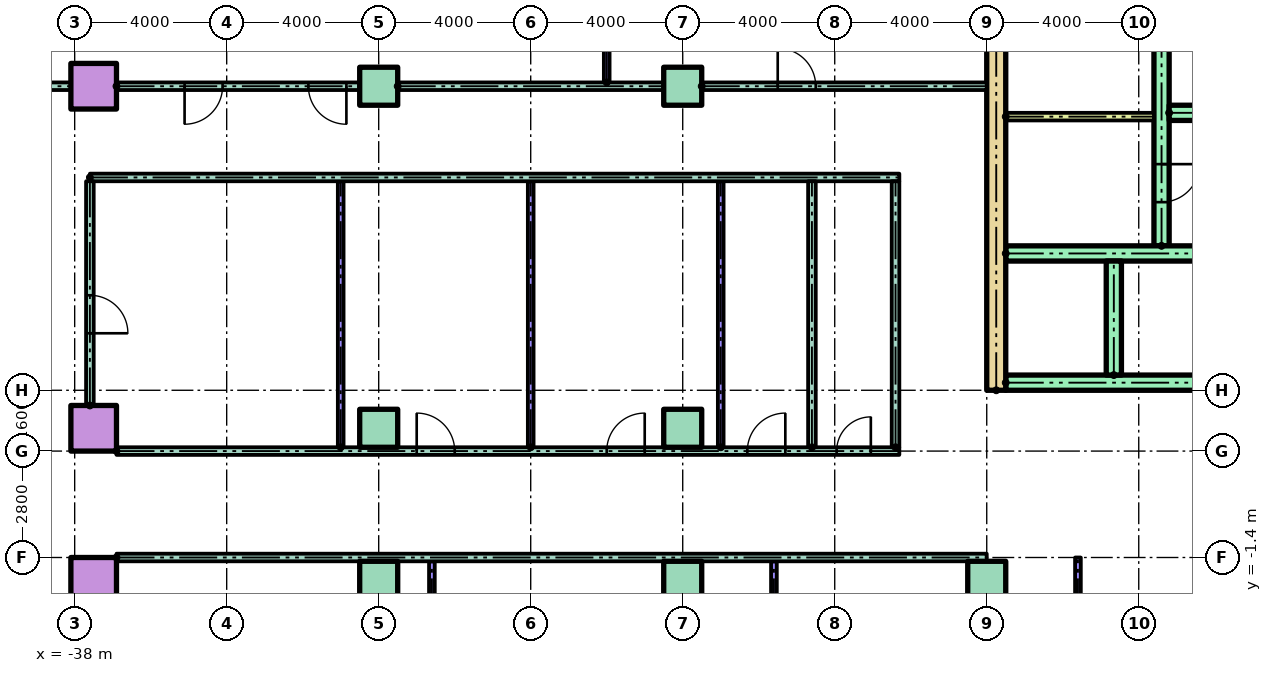
"""IFC4 building model, lengths in metres.
Left out: names, types, materials, properties, quantities, classifications, styles, units other than length and angle.
Written with IfcOpenShell. Run it as: python <this file> out.ifc"""

import sys

from ifc_helpers import new_model, si_unit, direction, frame, frame_2d, origin, origin_2d, place, context, subcontext, project, spatial, rectangle, hollow_rectangle, extrude, element, fill, save


model = new_model("IFC4")
c1 = context("Model", 3, precision=1e-05, world=origin(), true_north=direction((0.0, 1.0)))
c2 = subcontext(c1, "Body", "Model", "MODEL_VIEW")
j1 = project(units=[si_unit("LENGTHUNIT", "METRE"), si_unit("PLANEANGLEUNIT", "RADIAN")], contexts=[c1])
p1 = place(None, origin())
s1 = spatial("IfcSite", under=j1, at=p1, CompositionType="ELEMENT")
p2 = place(p1, origin())
s2 = spatial("IfcBuilding", under=s1, at=p2, CompositionType="ELEMENT")
p3 = place(p2, frame((0.0, 0.0, 6.0)))
s3 = spatial("IfcBuildingStorey", under=s2, at=p3, CompositionType="ELEMENT", Elevation=6.0)
p4 = place(p3, frame((-37.5, -2.0, 0.0)))
e1 = element("IfcColumn", 1, at=p4, inside=s3, PredefinedType="COLUMN", context=c2, shape_type="SweptSolid", body=[
    extrude(hollow_rectangle(XDim=1.2, YDim=1.2, WallThickness=0.06, at=origin_2d()), origin(), (0.0, 0.0, 1.0), 4.0),
])
for number, where in (
    (2, (-30.0, -2.0, 0.0)),
    (3, (-22.0, -2.0, 0.0)),
    (4, (-14.0, -2.0, 0.0)),
):
    element("IfcColumn", number, at=place(p3, frame(where)), inside=s3, PredefinedType="COLUMN", context=c2, shape_type="SweptSolid", body=[
        extrude(rectangle(XDim=1.0, YDim=1.0, at=origin_2d()), origin(), (0.0, 0.0, 1.0), 4.0),
    ])
p5 = place(p3, frame((-37.5, 2.0, 0.0)))
e5 = element("IfcColumn", 5, at=p5, inside=s3, PredefinedType="COLUMN", context=c2, shape_type="SweptSolid", body=[
    extrude(hollow_rectangle(XDim=1.2, YDim=1.2, WallThickness=0.06, at=origin_2d()), origin(), (0.0, 0.0, 1.0), 4.0),
])
for number, where in (
    (6, (-30.0, 2.0, 0.0)),
    (7, (-22.0, 2.0, 0.0)),
):
    element("IfcColumn", number, at=place(p3, frame(where)), inside=s3, PredefinedType="COLUMN", context=c2, shape_type="SweptSolid", body=[
        extrude(rectangle(XDim=1.0, YDim=1.0, at=origin_2d()), origin(), (0.0, 0.0, 1.0), 4.0),
    ])
p6 = place(p3, frame((-37.5, 11.0, 0.0)))
e8 = element("IfcColumn", 8, at=p6, inside=s3, PredefinedType="COLUMN", context=c2, shape_type="SweptSolid", body=[
    extrude(hollow_rectangle(XDim=1.2, YDim=1.2, WallThickness=0.06, at=origin_2d()), origin(), (0.0, 0.0, 1.0), 4.0),
])
for number, where in (
    (9, (-30.0, 11.0, 0.0)),
    (10, (-22.0, 11.0, 0.0)),
):
    element("IfcColumn", number, at=place(p3, frame(where)), inside=s3, PredefinedType="COLUMN", context=c2, shape_type="SweptSolid", body=[
        extrude(rectangle(XDim=1.0, YDim=1.0, at=origin_2d()), origin(), (0.0, 0.0, 1.0), 4.0),
    ])
p7 = place(p3, frame((-13.75, 3.0, 0.0), z_axis=(0.0, 0.0, 1.0), x_axis=(0.0, 1.0, 0.0)))
e11 = element("IfcWall", 11, at=p7, inside=s3, PredefinedType="SHEAR", context=c2, shape_type="SweptSolid", body=[
    extrude(rectangle(XDim=17.0, YDim=0.5, at=frame_2d((8.5, 0.0))), origin(), (0.0, 0.0, 1.0), 3.7),
])
p8 = place(p3, frame((-9.4, 6.8, 0.0), z_axis=(0.0, 0.0, 1.0), x_axis=(0.0, 1.0, 0.0)))
e12 = element("IfcWall", 12, at=p8, inside=s3, PredefinedType="SHEAR", context=c2, shape_type="SweptSolid", body=[
    extrude(rectangle(XDim=12.7, YDim=0.4, at=frame_2d((6.35, 0.0))), origin(), (0.0, 0.0, 1.0), 3.7),
])
p9 = place(p8, frame((1.15, 0.0, 0.0)))
e13 = element("IfcOpeningElement", 13, at=p9, cuts=e12, PredefinedType="OPENING", context=c2, shape_type="SweptSolid", body=[
    extrude(rectangle(XDim=1.0, YDim=2.1, at=frame_2d((0.5, 1.05))), frame((0.0, 0.21, 0.0), z_axis=(0.0, -1.0, 0.0), x_axis=(1.0, 0.0, 0.0)), (0.0, 0.0, 1.0), 0.42),
])
p10 = place(p8, frame((7.925, 0.0, 0.0)))
e14 = element("IfcOpeningElement", 14, at=p10, cuts=e12, PredefinedType="OPENING", context=c2, shape_type="SweptSolid", body=[
    extrude(rectangle(XDim=1.0, YDim=2.1, at=frame_2d((0.5, 1.05))), frame((0.0, 0.21, 0.0), z_axis=(0.0, -1.0, 0.0), x_axis=(1.0, 0.0, 0.0)), (0.0, 0.0, 1.0), 0.42),
])
p11 = place(p3, frame((-13.5, 3.2, 0.0)))
e15 = element("IfcWall", 15, at=p11, inside=s3, PredefinedType="SHEAR", context=c2, shape_type="SweptSolid", body=[
    extrude(rectangle(XDim=27.0, YDim=0.4, at=frame_2d((13.5, 0.0))), origin(), (0.0, 0.0, 1.0), 3.7),
])
p12 = place(p11, frame((6.861, 0.0, 0.0)))
e16 = element("IfcOpeningElement", 16, at=p12, cuts=e15, PredefinedType="OPENING", context=c2, shape_type="SweptSolid", body=[
    extrude(rectangle(XDim=1.1, YDim=2.1, at=frame_2d((0.55, 1.05))), frame((0.0, 0.21, 0.0), z_axis=(0.0, -1.0, 0.0), x_axis=(1.0, 0.0, 0.0)), (0.0, 0.0, 1.0), 0.42),
])
p13 = place(p11, frame((9.906, 0.0, 0.0)))
e17 = element("IfcOpeningElement", 17, at=p13, cuts=e15, PredefinedType="OPENING", context=c2, shape_type="SweptSolid", body=[
    extrude(rectangle(XDim=1.1, YDim=2.1, at=frame_2d((0.55, 1.05))), frame((0.0, 0.21, 0.0), z_axis=(0.0, -1.0, 0.0), x_axis=(1.0, 0.0, 0.0)), (0.0, 0.0, 1.0), 0.42),
])
p14 = place(p11, frame((15.994, 0.0, 0.0)))
e18 = element("IfcOpeningElement", 18, at=p14, cuts=e15, PredefinedType="OPENING", context=c2, shape_type="SweptSolid", body=[
    extrude(rectangle(XDim=1.1, YDim=2.1, at=frame_2d((0.55, 1.05))), frame((0.0, 0.21, 0.0), z_axis=(0.0, -1.0, 0.0), x_axis=(1.0, 0.0, 0.0)), (0.0, 0.0, 1.0), 0.42),
])
p15 = place(p11, frame((19.039, 0.0, 0.0)))
e19 = element("IfcOpeningElement", 19, at=p15, cuts=e15, PredefinedType="OPENING", context=c2, shape_type="SweptSolid", body=[
    extrude(rectangle(XDim=1.1, YDim=2.1, at=frame_2d((0.55, 1.05))), frame((0.0, 0.21, 0.0), z_axis=(0.0, -1.0, 0.0), x_axis=(1.0, 0.0, 0.0)), (0.0, 0.0, 1.0), 0.42),
])
p16 = place(p11, frame((12.6, 0.0, 0.0)))
e20 = element("IfcOpeningElement", 20, at=p16, cuts=e15, PredefinedType="OPENING", context=c2, shape_type="SweptSolid", body=[
    extrude(rectangle(XDim=1.8, YDim=2.1, at=frame_2d((0.9, 1.05))), frame((0.0, 0.21, 0.0), z_axis=(0.0, -1.0, 0.0), x_axis=(1.0, 0.0, 0.0)), (0.0, 0.0, 1.0), 0.42),
])
p17 = place(p3, frame((-13.5, 6.6, 0.0)))
e21 = element("IfcWall", 21, at=p17, inside=s3, PredefinedType="SHEAR", context=c2, shape_type="SweptSolid", body=[
    extrude(rectangle(XDim=11.978, YDim=0.4, at=frame_2d((5.989, 0.0))), origin(), (0.0, 0.0, 1.0), 3.7),
])
p18 = place(p3, frame((-10.656, 3.4, 0.0), z_axis=(0.0, 0.0, 1.0), x_axis=(0.0, 1.0, 0.0)))
e22 = element("IfcWall", 22, at=p18, inside=s3, PredefinedType="SHEAR", context=c2, shape_type="SweptSolid", body=[
    extrude(rectangle(XDim=3.0, YDim=0.4, at=frame_2d((1.5, 0.0))), origin(), (0.0, 0.0, 1.0), 3.7),
])
p19 = place(p3, frame((-9.2, 10.3, 0.0)))
e23 = element("IfcWall", 23, at=p19, inside=s3, PredefinedType="SHEAR", context=c2, shape_type="SweptSolid", body=[
    extrude(rectangle(XDim=8.0, YDim=0.4, at=frame_2d((4.0, 0.0))), origin(), (0.0, 0.0, 1.0), 3.7),
])
p20 = place(p19, frame((2.033, 0.0, 0.0)))
e24 = element("IfcOpeningElement", 24, at=p20, cuts=e23, PredefinedType="OPENING", context=c2, shape_type="SweptSolid", body=[
    extrude(rectangle(XDim=1.0, YDim=2.1, at=frame_2d((0.5, 1.05))), frame((0.0, 0.21, 0.0), z_axis=(0.0, -1.0, 0.0), x_axis=(1.0, 0.0, 0.0)), (0.0, 0.0, 1.0), 0.42),
])
p21 = place(p19, frame((6.133, 0.0, 0.0)))
e25 = element("IfcOpeningElement", 25, at=p21, cuts=e23, PredefinedType="OPENING", context=c2, shape_type="SweptSolid", body=[
    extrude(rectangle(XDim=1.0, YDim=2.1, at=frame_2d((0.5, 1.05))), frame((0.0, 0.21, 0.0), z_axis=(0.0, -1.0, 0.0), x_axis=(1.0, 0.0, 0.0)), (0.0, 0.0, 1.0), 0.42),
])
p22 = place(p3, frame((-13.5, 10.2, 0.0)))
e26 = element("IfcWall", 26, at=p22, inside=s3, PredefinedType="PARTITIONING", context=c2, shape_type="SweptSolid", body=[
    extrude(rectangle(XDim=3.9, YDim=0.2, at=frame_2d((1.95, 0.0))), origin(), (0.0, 0.0, 1.0), 3.7),
])
p23 = place(p3, frame((-36.9, -1.4, 0.0)))
e27 = element("IfcWall", 27, at=p23, inside=s3, PredefinedType="PARTITIONING", context=c2, shape_type="SweptSolid", body=[
    extrude(rectangle(XDim=22.9, YDim=0.2, at=frame_2d((11.45, 0.0))), origin(), (0.0, 0.0, 1.0), 3.7),
])
p24 = place(p3, frame((-36.9, 1.4, 0.0)))
e28 = element("IfcWall", 28, at=p24, inside=s3, PredefinedType="PARTITIONING", context=c2, shape_type="SweptSolid", body=[
    extrude(rectangle(XDim=20.6, YDim=0.2, at=frame_2d((10.3, 0.0))), origin(), (0.0, 0.0, 1.0), 3.7),
])
p25 = place(p24, frame((7.9, 0.0, 0.0)))
e29 = element("IfcOpeningElement", 29, at=p25, cuts=e28, PredefinedType="OPENING", context=c2, shape_type="SweptSolid", body=[
    extrude(rectangle(XDim=1.0, YDim=2.1, at=frame_2d((0.5, 1.05))), frame((0.0, 0.11, 0.0), z_axis=(0.0, -1.0, 0.0), x_axis=(1.0, 0.0, 0.0)), (0.0, 0.0, 1.0), 0.22),
])
p26 = place(p24, frame((12.9, 0.0, 0.0)))
e30 = element("IfcOpeningElement", 30, at=p26, cuts=e28, PredefinedType="OPENING", context=c2, shape_type="SweptSolid", body=[
    extrude(rectangle(XDim=1.0, YDim=2.1, at=frame_2d((0.5, 1.05))), frame((0.0, 0.11, 0.0), z_axis=(0.0, -1.0, 0.0), x_axis=(1.0, 0.0, 0.0)), (0.0, 0.0, 1.0), 0.22),
])
p27 = place(p24, frame((16.6, 0.0, 0.0)))
e31 = element("IfcOpeningElement", 31, at=p27, cuts=e28, PredefinedType="OPENING", context=c2, shape_type="SweptSolid", body=[
    extrude(rectangle(XDim=1.0, YDim=2.1, at=frame_2d((0.5, 1.05))), frame((0.0, 0.11, 0.0), z_axis=(0.0, -1.0, 0.0), x_axis=(1.0, 0.0, 0.0)), (0.0, 0.0, 1.0), 0.22),
])
p28 = place(p24, frame((18.95, 0.0, 0.0)))
e32 = element("IfcOpeningElement", 32, at=p28, cuts=e28, PredefinedType="OPENING", context=c2, shape_type="SweptSolid", body=[
    extrude(rectangle(XDim=0.9, YDim=2.1, at=frame_2d((0.45, 1.05))), frame((0.0, 0.11, 0.0), z_axis=(0.0, -1.0, 0.0), x_axis=(1.0, 0.0, 0.0)), (0.0, 0.0, 1.0), 0.22),
])
p29 = place(p3, frame((-37.6, 8.6, 0.0)))
e33 = element("IfcWall", 33, at=p29, inside=s3, PredefinedType="PARTITIONING", context=c2, shape_type="SweptSolid", body=[
    extrude(rectangle(XDim=21.3, YDim=0.2, at=frame_2d((10.65, 0.0))), origin(), (0.0, 0.0, 1.0), 3.7),
])
p30 = place(p3, frame((-39.6, 11.0, 0.0)))
e34 = element("IfcWall", 34, at=p30, inside=s3, PredefinedType="PARTITIONING", context=c2, shape_type="SweptSolid", body=[
    extrude(rectangle(XDim=1.5, YDim=0.2, at=frame_2d((0.75, 0.0))), origin(), (0.0, 0.0, 1.0), 3.7),
])
p31 = place(p3, frame((-36.9, 11.0, 0.0)))
e35 = element("IfcWall", 35, at=p31, inside=s3, PredefinedType="PARTITIONING", context=c2, shape_type="SweptSolid", body=[
    extrude(rectangle(XDim=6.4, YDim=0.2, at=frame_2d((3.2, 0.0))), origin(), (0.0, 0.0, 1.0), 3.7),
])
p32 = place(p31, frame((1.792, 0.0, 0.0)))
e36 = element("IfcOpeningElement", 36, at=p32, cuts=e35, PredefinedType="OPENING", context=c2, shape_type="SweptSolid", body=[
    extrude(rectangle(XDim=1.0, YDim=2.1, at=frame_2d((0.5, 1.05))), frame((0.0, 0.11, 0.0), z_axis=(0.0, -1.0, 0.0), x_axis=(1.0, 0.0, 0.0)), (0.0, 0.0, 1.0), 0.22),
])
p33 = place(p31, frame((5.05, 0.0, 0.0)))
e37 = element("IfcOpeningElement", 37, at=p33, cuts=e35, PredefinedType="OPENING", context=c2, shape_type="SweptSolid", body=[
    extrude(rectangle(XDim=1.0, YDim=2.1, at=frame_2d((0.5, 1.05))), frame((0.0, 0.11, 0.0), z_axis=(0.0, -1.0, 0.0), x_axis=(1.0, 0.0, 0.0)), (0.0, 0.0, 1.0), 0.22),
])
p34 = place(p3, frame((-29.5, 11.0, 0.0)))
e38 = element("IfcWall", 38, at=p34, inside=s3, PredefinedType="PARTITIONING", context=c2, shape_type="SweptSolid", body=[
    extrude(rectangle(XDim=7.0, YDim=0.2, at=frame_2d((3.5, 0.0))), origin(), (0.0, 0.0, 1.0), 3.7),
])
p35 = place(p3, frame((-21.5, 11.0, 0.0)))
e39 = element("IfcWall", 39, at=p35, inside=s3, PredefinedType="PARTITIONING", context=c2, shape_type="SweptSolid", body=[
    extrude(rectangle(XDim=7.5, YDim=0.2, at=frame_2d((3.75, 0.0))), origin(), (0.0, 0.0, 1.0), 3.7),
])
p36 = place(p35, frame((2.0, 0.0, 0.0)))
e40 = element("IfcOpeningElement", 40, at=p36, cuts=e39, PredefinedType="OPENING", context=c2, shape_type="SweptSolid", body=[
    extrude(rectangle(XDim=1.0, YDim=2.1, at=frame_2d((0.5, 1.05))), frame((0.0, 0.11, 0.0), z_axis=(0.0, -1.0, 0.0), x_axis=(1.0, 0.0, 0.0)), (0.0, 0.0, 1.0), 0.22),
])
p37 = place(p3, frame((-37.6, 2.6, 0.0), z_axis=(0.0, 0.0, 1.0), x_axis=(0.0, 1.0, 0.0)))
e41 = element("IfcWall", 41, at=p37, inside=s3, PredefinedType="PARTITIONING", context=c2, shape_type="SweptSolid", body=[
    extrude(rectangle(XDim=5.9, YDim=0.2, at=frame_2d((2.95, 0.0))), origin(), (0.0, 0.0, 1.0), 3.7),
])
p38 = place(p37, frame((1.9, 0.0, 0.0)))
e42 = element("IfcOpeningElement", 42, at=p38, cuts=e41, PredefinedType="OPENING", context=c2, shape_type="SweptSolid", body=[
    extrude(rectangle(XDim=1.0, YDim=2.1, at=frame_2d((0.5, 1.05))), frame((0.0, 0.11, 0.0), z_axis=(0.0, -1.0, 0.0), x_axis=(1.0, 0.0, 0.0)), (0.0, 0.0, 1.0), 0.22),
])
p39 = place(p3, frame((-31.0, 1.5, 0.0), z_axis=(0.0, 0.0, 1.0), x_axis=(0.0, 1.0, 0.0)))
e43 = element("IfcWall", 43, at=p39, inside=s3, PredefinedType="PARTITIONING", context=c2, shape_type="SweptSolid", body=[
    extrude(rectangle(XDim=7.0, YDim=0.15, at=frame_2d((3.5, 0.0))), origin(), (0.0, 0.0, 1.0), 3.7),
])
p40 = place(p3, frame((-28.6, -6.25, 0.0), z_axis=(0.0, 0.0, 1.0), x_axis=(0.0, 1.0, 0.0)))
e44 = element("IfcWall", 44, at=p40, inside=s3, PredefinedType="PARTITIONING", context=c2, shape_type="SweptSolid", body=[
    extrude(rectangle(XDim=4.75, YDim=0.15, at=frame_2d((2.375, 0.0))), origin(), (0.0, 0.0, 1.0), 3.7),
])
p41 = place(p3, frame((-26.0, 1.5, 0.0), z_axis=(0.0, 0.0, 1.0), x_axis=(0.0, 1.0, 0.0)))
e45 = element("IfcWall", 45, at=p41, inside=s3, PredefinedType="PARTITIONING", context=c2, shape_type="SweptSolid", body=[
    extrude(rectangle(XDim=7.0, YDim=0.15, at=frame_2d((3.5, 0.0))), origin(), (0.0, 0.0, 1.0), 3.7),
])
p42 = place(p3, frame((-24.0, 11.1, 0.0), z_axis=(0.0, 0.0, 1.0), x_axis=(0.0, 1.0, 0.0)))
e46 = element("IfcWall", 46, at=p42, inside=s3, PredefinedType="PARTITIONING", context=c2, shape_type="SweptSolid", body=[
    extrude(rectangle(XDim=8.5, YDim=0.15, at=frame_2d((4.25, 0.0))), origin(), (0.0, 0.0, 1.0), 3.7),
])
p43 = place(p3, frame((-21.0, 1.5, 0.0), z_axis=(0.0, 0.0, 1.0), x_axis=(0.0, 1.0, 0.0)))
e47 = element("IfcWall", 47, at=p43, inside=s3, PredefinedType="PARTITIONING", context=c2, shape_type="SweptSolid", body=[
    extrude(rectangle(XDim=7.0, YDim=0.15, at=frame_2d((3.5, 0.0))), origin(), (0.0, 0.0, 1.0), 3.7),
])
p44 = place(p3, frame((-19.6, -6.25, 0.0), z_axis=(0.0, 0.0, 1.0), x_axis=(0.0, 1.0, 0.0)))
e48 = element("IfcWall", 48, at=p44, inside=s3, PredefinedType="PARTITIONING", context=c2, shape_type="SweptSolid", body=[
    extrude(rectangle(XDim=4.75, YDim=0.15, at=frame_2d((2.375, 0.0))), origin(), (0.0, 0.0, 1.0), 3.7),
])
for number, where, z_axis, x_axis in (
    (49, (-18.6, 1.5, 0.0), (0.0, 0.0, 1.0), (0.0, 1.0, 0.0)),
    (50, (-16.4, 1.5, 0.0), (0.0, 0.0, 1.0), (0.0, 1.0, 0.0)),
):
    element("IfcWall", number, at=place(p3, frame(where, z_axis=z_axis, x_axis=x_axis)), inside=s3, PredefinedType="PARTITIONING", context=c2, shape_type="SweptSolid", body=[
        extrude(rectangle(XDim=7.0, YDim=0.2, at=frame_2d((3.5, 0.0))), origin(), (0.0, 0.0, 1.0), 3.7),
    ])
p45 = place(p3, frame((-11.6, -6.25, 0.0), z_axis=(0.0, 0.0, 1.0), x_axis=(0.0, 1.0, 0.0)))
e51 = element("IfcWall", 51, at=p45, inside=s3, PredefinedType="PARTITIONING", context=c2, shape_type="SweptSolid", body=[
    extrude(rectangle(XDim=4.85, YDim=0.15, at=frame_2d((2.425, 0.0))), origin(), (0.0, 0.0, 1.0), 3.7),
])
p46 = place(p9, frame((1.0, 0.0, 0.0), z_axis=(0.0, 0.0, 1.0), x_axis=(-1.0, 0.0, 0.0)))
e52 = element("IfcDoor", 52, at=p46, inside=s3, OperationType="SINGLE_SWING_RIGHT", PredefinedType="DOOR", context=c2, shape_type="SweptSolid", body=[
    extrude(rectangle(XDim=1.0, YDim=2.1, at=frame_2d((0.5, 1.05))), frame((0.0, 0.025, 0.0), z_axis=(0.0, -1.0, 0.0), x_axis=(1.0, 0.0, 0.0)), (0.0, 0.0, 1.0), 0.05),
])
fill(e13, e52)
p47 = place(p38, frame((1.0, 0.0, 0.0), z_axis=(0.0, 0.0, 1.0), x_axis=(-1.0, 0.0, 0.0)))
e53 = element("IfcDoor", 53, at=p47, inside=s3, OperationType="SINGLE_SWING_LEFT", PredefinedType="DOOR", context=c2, shape_type="SweptSolid", body=[
    extrude(rectangle(XDim=1.0, YDim=2.1, at=frame_2d((0.5, 1.05))), frame((0.0, 0.025, 0.0), z_axis=(0.0, -1.0, 0.0), x_axis=(1.0, 0.0, 0.0)), (0.0, 0.0, 1.0), 0.05),
])
fill(e42, e53)
p48 = place(p25, origin())
e54 = element("IfcDoor", 54, at=p48, inside=s3, OperationType="SINGLE_SWING_LEFT", PredefinedType="DOOR", context=c2, shape_type="SweptSolid", body=[
    extrude(rectangle(XDim=1.0, YDim=2.1, at=frame_2d((0.5, 1.05))), frame((0.0, 0.025, 0.0), z_axis=(0.0, -1.0, 0.0), x_axis=(1.0, 0.0, 0.0)), (0.0, 0.0, 1.0), 0.05),
])
fill(e29, e54)
p49 = place(p26, origin())
e55 = element("IfcDoor", 55, at=p49, inside=s3, OperationType="SINGLE_SWING_RIGHT", PredefinedType="DOOR", context=c2, shape_type="SweptSolid", body=[
    extrude(rectangle(XDim=1.0, YDim=2.1, at=frame_2d((0.5, 1.05))), frame((0.0, 0.025, 0.0), z_axis=(0.0, -1.0, 0.0), x_axis=(1.0, 0.0, 0.0)), (0.0, 0.0, 1.0), 0.05),
])
fill(e30, e55)
p50 = place(p27, origin())
e56 = element("IfcDoor", 56, at=p50, inside=s3, OperationType="SINGLE_SWING_RIGHT", PredefinedType="DOOR", context=c2, shape_type="SweptSolid", body=[
    extrude(rectangle(XDim=1.0, YDim=2.1, at=frame_2d((0.5, 1.05))), frame((0.0, 0.025, 0.0), z_axis=(0.0, -1.0, 0.0), x_axis=(1.0, 0.0, 0.0)), (0.0, 0.0, 1.0), 0.05),
])
fill(e31, e56)
p51 = place(p28, origin())
e57 = element("IfcDoor", 57, at=p51, inside=s3, OperationType="SINGLE_SWING_RIGHT", PredefinedType="DOOR", context=c2, shape_type="SweptSolid", body=[
    extrude(rectangle(XDim=0.9, YDim=2.1, at=frame_2d((0.45, 1.05))), frame((0.0, 0.025, 0.0), z_axis=(0.0, -1.0, 0.0), x_axis=(1.0, 0.0, 0.0)), (0.0, 0.0, 1.0), 0.05),
])
fill(e32, e57)
p52 = place(p32, frame((1.0, 0.0, 0.0), z_axis=(0.0, 0.0, 1.0), x_axis=(-1.0, 0.0, 0.0)))
e58 = element("IfcDoor", 58, at=p52, inside=s3, OperationType="SINGLE_SWING_LEFT", PredefinedType="DOOR", context=c2, shape_type="SweptSolid", body=[
    extrude(rectangle(XDim=1.0, YDim=2.1, at=frame_2d((0.5, 1.05))), frame((0.0, 0.025, 0.0), z_axis=(0.0, -1.0, 0.0), x_axis=(1.0, 0.0, 0.0)), (0.0, 0.0, 1.0), 0.05),
])
fill(e36, e58)
p53 = place(p33, frame((1.0, 0.0, 0.0), z_axis=(0.0, 0.0, 1.0), x_axis=(-1.0, 0.0, 0.0)))
e59 = element("IfcDoor", 59, at=p53, inside=s3, OperationType="SINGLE_SWING_RIGHT", PredefinedType="DOOR", context=c2, shape_type="SweptSolid", body=[
    extrude(rectangle(XDim=1.0, YDim=2.1, at=frame_2d((0.5, 1.05))), frame((0.0, 0.025, 0.0), z_axis=(0.0, -1.0, 0.0), x_axis=(1.0, 0.0, 0.0)), (0.0, 0.0, 1.0), 0.05),
])
fill(e37, e59)
p54 = place(p36, origin())
e60 = element("IfcDoor", 60, at=p54, inside=s3, OperationType="SINGLE_SWING_LEFT", PredefinedType="DOOR", context=c2, shape_type="SweptSolid", body=[
    extrude(rectangle(XDim=1.0, YDim=2.1, at=frame_2d((0.5, 1.05))), frame((0.0, 0.025, 0.0), z_axis=(0.0, -1.0, 0.0), x_axis=(1.0, 0.0, 0.0)), (0.0, 0.0, 1.0), 0.05),
])
fill(e40, e60)
save(model, sys.argv[1])
